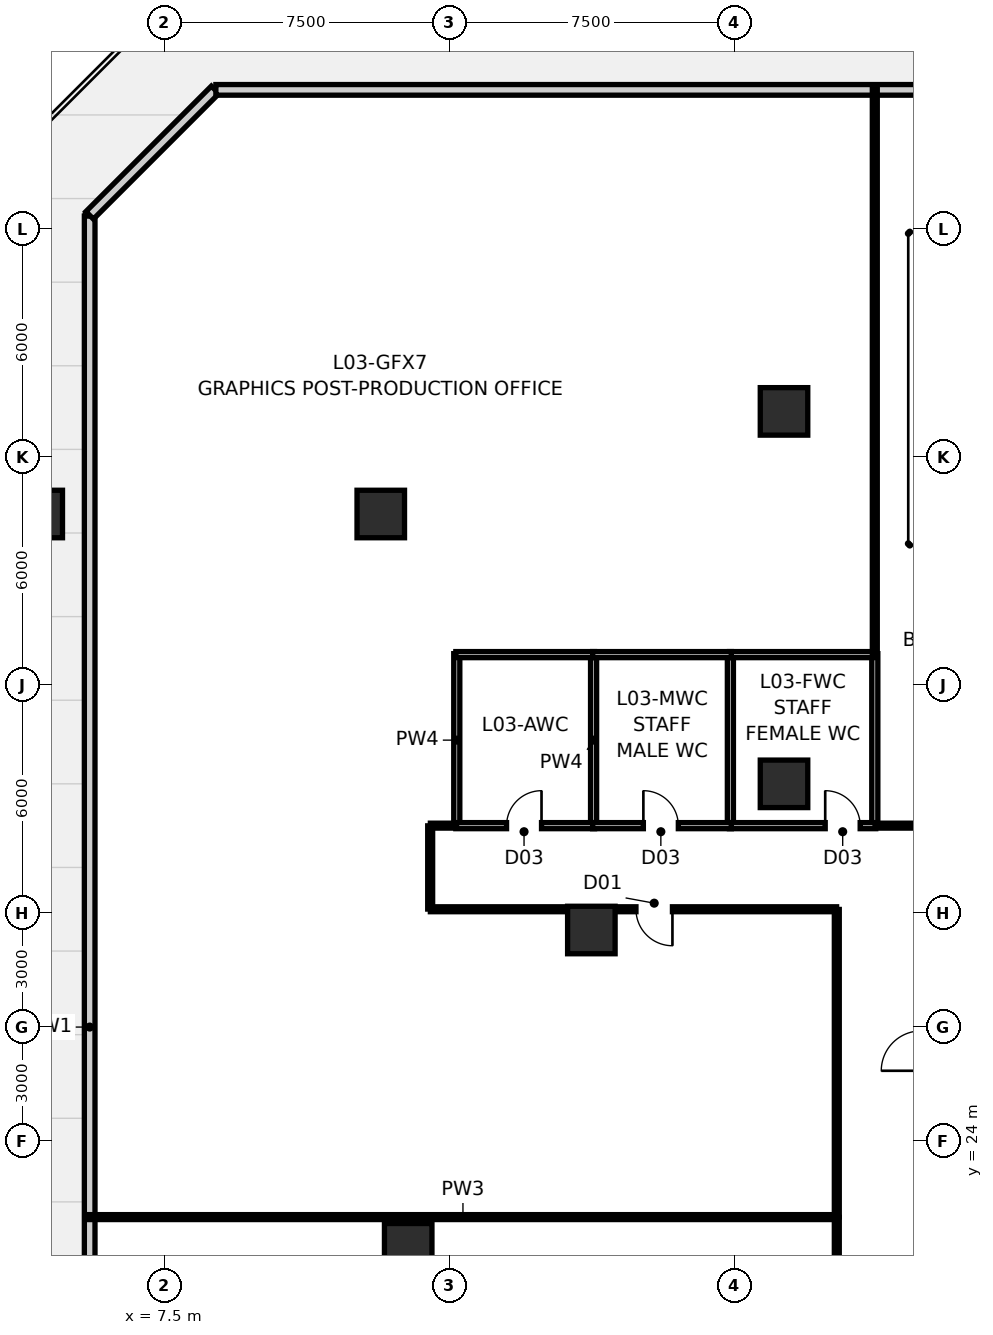
"""IFC4 building model, lengths in metres.
Left out: names, types, materials, properties, quantities, classifications, styles, units other than length and angle.
Written with IfcOpenShell. Run it as: python <this file> out.ifc"""

import sys

from ifc_helpers import new_model, si_unit, direction, frame, frame_2d, origin, origin_2d, place, context, subcontext, project, spatial, rectangle, hollow_rectangle, extrude, source, transform, mapped, element, fill, save


model = new_model("IFC4")
c1 = context("Model", 3, precision=1e-05, world=origin(), true_north=direction((0.0, 1.0)))
c2 = subcontext(c1, "Body", "Model", "MODEL_VIEW")
j1 = project(units=[si_unit("LENGTHUNIT", "METRE"), si_unit("PLANEANGLEUNIT", "RADIAN")], contexts=[c1])
p1 = place(None, origin())
s1 = spatial("IfcSite", under=j1, at=p1, CompositionType="ELEMENT")
p2 = place(p1, origin())
s2 = spatial("IfcBuilding", under=s1, at=p2, CompositionType="ELEMENT")
p3 = place(p2, frame((0.0, 0.0, 14.7)))
s3 = spatial("IfcBuildingStorey", under=s2, at=p3, CompositionType="ELEMENT", Elevation=14.7)
m1 = source(origin(), c2, "Body", "SweptSolid", [
    extrude(hollow_rectangle(XDim=1.25, YDim=1.25, WallThickness=0.07, at=origin_2d()), origin(), (0.0, 0.0, 1.0), 4.201),
])
p4 = place(p3, frame((18.741, 29.554, 0.0), z_axis=(0.014936170945, -0.013773823012, 0.999793574993), x_axis=(0.677923610644, 0.735132354159, 0.0)))
e1 = element("IfcColumn", 1, at=p4, inside=s3, PredefinedType="COLUMN", context=c2, shape_type="MappedRepresentation", body=[
    mapped(m1, transform((0.0, 0.0, 0.0), scale=1.0)),
])
m2 = source(origin(), c2, "Body", "SweptSolid", [
    extrude(hollow_rectangle(XDim=1.25, YDim=1.25, WallThickness=0.07, at=origin_2d()), origin(), (0.0, 0.0, 1.0), 4.201),
])
p5 = place(p3, frame((13.922, 21.206, 0.0), z_axis=(0.01040216717, -0.021617911661, 0.999712188989), x_axis=(0.90110684469, 0.433597110752, 0.0)))
e2 = element("IfcColumn", 2, at=p5, inside=s3, PredefinedType="COLUMN", context=c2, shape_type="MappedRepresentation", body=[
    mapped(m2, transform((0.0, 0.0, 0.0), scale=1.0)),
])
m3 = source(origin(), c2, "Body", "SweptSolid", [
    extrude(hollow_rectangle(XDim=1.25, YDim=1.25, WallThickness=0.07, at=origin_2d()), origin(), (0.0, 0.0, 1.0), 4.2),
])
for number, where, z_axis, x_axis in (
    (3, (23.811, 33.4, 0.0), (0.0, 0.0, 1.0), (1.0, 0.0, 0.0)),
    (4, (23.811, 43.2, 0.0), (0.0, 0.0, 1.0), (1.0, 0.0, 0.0)),
    (5, (4.2, 40.5, 0.0), (0.0, 0.0, 1.0), (1.0, 0.0, 0.0)),
    (6, (13.2, 40.5, 0.0), (0.0, 0.0, 1.0), (1.0, 0.0, 0.0)),
):
    element("IfcColumn", number, at=place(p3, frame(where, z_axis=z_axis, x_axis=x_axis)), inside=s3, PredefinedType="COLUMN", context=c2, shape_type="MappedRepresentation", body=[
        mapped(m3, transform((0.0, 0.0, 0.0), scale=1.0)),
    ])
p6 = place(p3, frame((5.54, 5.661, 0.0), z_axis=(0.0, 0.0, 1.0), x_axis=(0.0, 1.0, 0.0)))
e7 = element("IfcWall", 7, at=p6, inside=s3, PredefinedType="STANDARD", context=c2, shape_type="SweptSolid", body=[
    extrude(rectangle(XDim=42.678, YDim=0.28, at=frame_2d((21.339, 0.0))), origin(), (0.0, 0.0, 1.0), 3.88),
])
p7 = place(p3, frame((5.54, 48.359, 0.0), z_axis=(0.0, 0.0, 1.0), x_axis=(0.707106781187, 0.707106781187, 0.0)))
e8 = element("IfcWall", 8, at=p7, inside=s3, PredefinedType="STANDARD", context=c2, shape_type="SweptSolid", body=[
    extrude(rectangle(XDim=4.668, YDim=0.28, at=frame_2d((2.334, 0.0))), origin(), (0.0, 0.0, 1.0), 3.88),
])
p8 = place(p3, frame((8.861, 51.66, 0.0), z_axis=(0.0, 0.0, 1.0), x_axis=(1.0, 0.0, 0.0)))
e9 = element("IfcWall", 9, at=p8, inside=s3, PredefinedType="STANDARD", context=c2, shape_type="SweptSolid", body=[
    extrude(rectangle(XDim=58.878, YDim=0.28, at=frame_2d((29.439, 0.0))), origin(), (0.0, 0.0, 1.0), 3.88),
])
for number, where, z_axis, x_axis in (
    (10, (15.2, 32.275, 0.0), (0.0, 0.0, 1.0), (0.0, 1.0, 0.0)),
    (11, (18.8, 32.275, 0.0), (0.0, 0.0, 1.0), (0.0, 1.0, 0.0)),
    (12, (22.4, 32.275, 0.0), (0.0, 0.0, 1.0), (0.0, 1.0, 0.0)),
    (13, (26.2, 32.275, 0.0), (0.0, 0.0, 1.0), (0.0, 1.0, 0.0)),
):
    element("IfcWall", number, at=place(p3, frame(where, z_axis=z_axis, x_axis=x_axis)), inside=s3, PredefinedType="PLUMBINGWALL", context=c2, shape_type="SweptSolid", body=[
        extrude(rectangle(XDim=4.55, YDim=0.16, at=frame_2d((2.275, 0.0))), origin(), (0.0, 0.0, 1.0), 3.88),
    ])
p9 = place(p3, frame((22.375, 32.3, 0.0), z_axis=(0.0, 0.0, 1.0), x_axis=(1.0, 0.0, 0.0)))
e14 = element("IfcWall", 14, at=p9, inside=s3, PredefinedType="PLUMBINGWALL", context=c2, shape_type="SweptSolid", body=[
    extrude(rectangle(XDim=3.85, YDim=0.16, at=frame_2d((1.925, 0.0))), origin(), (0.0, 0.0, 1.0), 3.88),
])
p10 = place(p9, frame((2.52, 0.0, 0.0)))
e15 = element("IfcOpeningElement", 15, at=p10, cuts=e14, PredefinedType="OPENING", context=c2, shape_type="SweptSolid", body=[
    extrude(rectangle(XDim=0.92, YDim=2.1, at=frame_2d((0.46, 1.05))), frame((0.0, 0.092, 0.0), z_axis=(0.0, -1.0, 0.0), x_axis=(1.0, 0.0, 0.0)), (0.0, 0.0, 1.0), 0.184),
])
p11 = place(p3, frame((22.375, 36.8, 0.0), z_axis=(0.0, 0.0, 1.0), x_axis=(1.0, 0.0, 0.0)))
e16 = element("IfcWall", 16, at=p11, inside=s3, PredefinedType="PLUMBINGWALL", context=c2, shape_type="SweptSolid", body=[
    extrude(rectangle(XDim=3.85, YDim=0.16, at=frame_2d((1.925, 0.0))), origin(), (0.0, 0.0, 1.0), 3.459),
])
p12 = place(p3, frame((15.175, 32.3, 0.0), z_axis=(0.0, 0.0, 1.0), x_axis=(1.0, 0.0, 0.0)))
e17 = element("IfcWall", 17, at=p12, inside=s3, PredefinedType="PLUMBINGWALL", context=c2, shape_type="SweptSolid", body=[
    extrude(rectangle(XDim=3.65, YDim=0.16, at=frame_2d((1.825, 0.0))), origin(), (0.0, 0.0, 1.0), 3.88),
])
p13 = place(p12, frame((1.335, 0.0, 0.0)))
e18 = element("IfcOpeningElement", 18, at=p13, cuts=e17, PredefinedType="OPENING", context=c2, shape_type="SweptSolid", body=[
    extrude(rectangle(XDim=0.92, YDim=2.1, at=frame_2d((0.46, 1.05))), frame((0.0, 0.092, 0.0), z_axis=(0.0, -1.0, 0.0), x_axis=(1.0, 0.0, 0.0)), (0.0, 0.0, 1.0), 0.184),
])
p14 = place(p3, frame((15.175, 36.8, 0.0), z_axis=(0.0, 0.0, 1.0), x_axis=(1.0, 0.0, 0.0)))
e19 = element("IfcWall", 19, at=p14, inside=s3, PredefinedType="PLUMBINGWALL", context=c2, shape_type="SweptSolid", body=[
    extrude(rectangle(XDim=3.65, YDim=0.16, at=frame_2d((1.825, 0.0))), origin(), (0.0, 0.0, 1.0), 3.88),
])
p15 = place(p3, frame((18.775, 32.3, 0.0), z_axis=(0.0, 0.0, 1.0), x_axis=(1.0, 0.0, 0.0)))
e20 = element("IfcWall", 20, at=p15, inside=s3, PredefinedType="PLUMBINGWALL", context=c2, shape_type="SweptSolid", body=[
    extrude(rectangle(XDim=3.65, YDim=0.16, at=frame_2d((1.825, 0.0))), origin(), (0.0, 0.0, 1.0), 3.88),
])
p16 = place(p15, frame((1.335, 0.0, 0.0)))
e21 = element("IfcOpeningElement", 21, at=p16, cuts=e20, PredefinedType="OPENING", context=c2, shape_type="SweptSolid", body=[
    extrude(rectangle(XDim=0.92, YDim=2.1, at=frame_2d((0.46, 1.05))), frame((0.0, 0.092, 0.0), z_axis=(0.0, -1.0, 0.0), x_axis=(1.0, 0.0, 0.0)), (0.0, 0.0, 1.0), 0.184),
])
p17 = place(p3, frame((18.775, 36.8, 0.0), z_axis=(0.0, 0.0, 1.0), x_axis=(1.0, 0.0, 0.0)))
e22 = element("IfcWall", 22, at=p17, inside=s3, PredefinedType="PLUMBINGWALL", context=c2, shape_type="SweptSolid", body=[
    extrude(rectangle(XDim=3.65, YDim=0.16, at=frame_2d((1.825, 0.0))), origin(), (0.0, 0.0, 1.0), 3.88),
])
p18 = place(p3, frame((5.53, 22.0, 0.0), z_axis=(0.0, 0.0, 1.0), x_axis=(1.0, 0.0, 0.0)))
e23 = element("IfcWall", 23, at=p18, inside=s3, PredefinedType="PARTITIONING", context=c2, shape_type="SweptSolid", body=[
    extrude(rectangle(XDim=19.665, YDim=0.13, at=frame_2d((9.833, 0.0))), origin(), (0.0, 0.0, 1.0), 3.88),
])
p19 = place(p3, frame((26.2, 36.805, 0.0), z_axis=(0.0, 0.0, 1.0), x_axis=(0.0, 1.0, 0.0)))
e24 = element("IfcWall", 24, at=p19, inside=s3, PredefinedType="PARTITIONING", context=c2, shape_type="SweptSolid", body=[
    extrude(rectangle(XDim=14.865, YDim=0.13, at=frame_2d((7.433, 0.0))), origin(), (0.0, 0.0, 1.0), 3.88),
])
p20 = place(p3, frame((26.205, 32.3, 0.0), z_axis=(0.0, 0.0, 1.0), x_axis=(1.0, 0.0, 0.0)))
e25 = element("IfcWall", 25, at=p20, inside=s3, PredefinedType="PARTITIONING", context=c2, shape_type="SweptSolid", body=[
    extrude(rectangle(XDim=14.79, YDim=0.13, at=frame_2d((7.395, 0.0))), origin(), (0.0, 0.0, 1.0), 3.88),
])
p21 = place(p20, frame((6.915, 0.0, 0.0)))
e26 = element("IfcOpeningElement", 26, at=p21, cuts=e25, PredefinedType="OPENING", context=c2, shape_type="SweptSolid", body=[
    extrude(rectangle(XDim=0.96, YDim=2.15, at=frame_2d((0.48, 1.075))), frame((0.0, 0.077, 0.0), z_axis=(0.0, -1.0, 0.0), x_axis=(1.0, 0.0, 0.0)), (0.0, 0.0, 1.0), 0.154),
])
p22 = place(p3, frame((25.195, 30.1, 0.0), z_axis=(0.0, 0.0, 1.0), x_axis=(-1.0, 0.0, 0.0)))
e27 = element("IfcWall", 27, at=p22, inside=s3, PredefinedType="PARTITIONING", context=c2, shape_type="SweptSolid", body=[
    extrude(rectangle(XDim=10.69, YDim=0.13, at=frame_2d((5.345, 0.0))), origin(), (0.0, 0.0, 1.0), 3.253),
])
p23 = place(p22, frame((4.32, 0.0, 0.0)))
e28 = element("IfcOpeningElement", 28, at=p23, cuts=e27, PredefinedType="OPENING", context=c2, shape_type="SweptSolid", body=[
    extrude(rectangle(XDim=0.96, YDim=2.15, at=frame_2d((0.48, 1.075))), frame((0.0, 0.077, 0.0), z_axis=(0.0, -1.0, 0.0), x_axis=(1.0, 0.0, 0.0)), (0.0, 0.0, 1.0), 0.154),
])
p24 = place(p3, frame((25.2, 12.205, 0.0), z_axis=(0.0, 0.0, 1.0), x_axis=(0.0, 1.0, 0.0)))
e29 = element("IfcWall", 29, at=p24, inside=s3, PredefinedType="PARTITIONING", context=c2, shape_type="SweptSolid", body=[
    extrude(rectangle(XDim=9.79, YDim=0.13, at=frame_2d((4.895, 0.0))), origin(), (0.0, 0.0, 1.0), 3.88),
])
p25 = place(p24, frame((4.415, 0.0, 0.0)))
e30 = element("IfcOpeningElement", 30, at=p25, cuts=e29, PredefinedType="OPENING", context=c2, shape_type="SweptSolid", body=[
    extrude(rectangle(XDim=0.96, YDim=2.15, at=frame_2d((0.48, 1.075))), frame((0.0, 0.077, 0.0), z_axis=(0.0, -1.0, 0.0), x_axis=(1.0, 0.0, 0.0)), (0.0, 0.0, 1.0), 0.154),
])
p26 = place(p3, frame((25.2, 22.005, 0.0), z_axis=(0.0, 0.0, 1.0), x_axis=(0.0, 1.0, 0.0)))
e31 = element("IfcWall", 31, at=p26, inside=s3, PredefinedType="PARTITIONING", context=c2, shape_type="SweptSolid", body=[
    extrude(rectangle(XDim=8.09, YDim=0.13, at=frame_2d((4.045, 0.0))), origin(), (0.0, 0.0, 1.0), 3.506),
])
p27 = place(p3, frame((14.5, 30.105, 0.0), z_axis=(0.0, 0.0, 1.0), x_axis=(0.0, 1.0, 0.0)))
e32 = element("IfcWall", 32, at=p27, inside=s3, PredefinedType="PARTITIONING", context=c2, shape_type="SweptSolid", body=[
    extrude(rectangle(XDim=2.19, YDim=0.13, at=frame_2d((1.095, 0.0))), origin(), (0.0, 0.0, 1.0), 3.88),
])
p28 = place(p3, frame((14.505, 32.3, 0.0), z_axis=(0.0, 0.0, 1.0), x_axis=(1.0, 0.0, 0.0)))
e33 = element("IfcWall", 33, at=p28, inside=s3, PredefinedType="PARTITIONING", context=c2, shape_type="SweptSolid", body=[
    extrude(rectangle(XDim=0.69, YDim=0.13, at=frame_2d((0.345, 0.0))), origin(), (0.0, 0.0, 1.0), 3.88),
])
p29 = place(p10, origin())
e34 = element("IfcDoor", 34, at=p29, inside=s3, OperationType="SINGLE_SWING_LEFT", PredefinedType="DOOR", context=c2, shape_type="SweptSolid", body=[
    extrude(rectangle(XDim=0.92, YDim=2.1, at=frame_2d((0.46, 1.05))), frame((0.0, 0.025, 0.0), z_axis=(0.0, -1.0, 0.0), x_axis=(1.0, 0.0, 0.0)), (0.0, 0.0, 1.0), 0.05),
])
fill(e15, e34)
p30 = place(p13, origin())
e35 = element("IfcDoor", 35, at=p30, inside=s3, OperationType="SINGLE_SWING_RIGHT", PredefinedType="DOOR", context=c2, shape_type="SweptSolid", body=[
    extrude(rectangle(XDim=0.92, YDim=2.1, at=frame_2d((0.46, 1.05))), frame((0.0, 0.025, 0.0), z_axis=(0.0, -1.0, 0.0), x_axis=(1.0, 0.0, 0.0)), (0.0, 0.0, 1.0), 0.05),
])
fill(e18, e35)
p31 = place(p16, origin())
e36 = element("IfcDoor", 36, at=p31, inside=s3, OperationType="SINGLE_SWING_LEFT", PredefinedType="DOOR", context=c2, shape_type="SweptSolid", body=[
    extrude(rectangle(XDim=0.92, YDim=2.1, at=frame_2d((0.46, 1.05))), frame((0.0, 0.025, 0.0), z_axis=(0.0, -1.0, 0.0), x_axis=(1.0, 0.0, 0.0)), (0.0, 0.0, 1.0), 0.05),
])
fill(e21, e36)
p32 = place(p23, origin())
e37 = element("IfcDoor", 37, at=p32, inside=s3, OperationType="SINGLE_SWING_LEFT", PredefinedType="DOOR", context=c2, shape_type="SweptSolid", body=[
    extrude(rectangle(XDim=0.96, YDim=2.15, at=frame_2d((0.48, 1.075))), frame((0.0, 0.025, 0.0), z_axis=(0.0, -1.0, 0.0), x_axis=(1.0, 0.0, 0.0)), (0.0, 0.0, 1.0), 0.05),
])
fill(e28, e37)
save(model, sys.argv[1])
